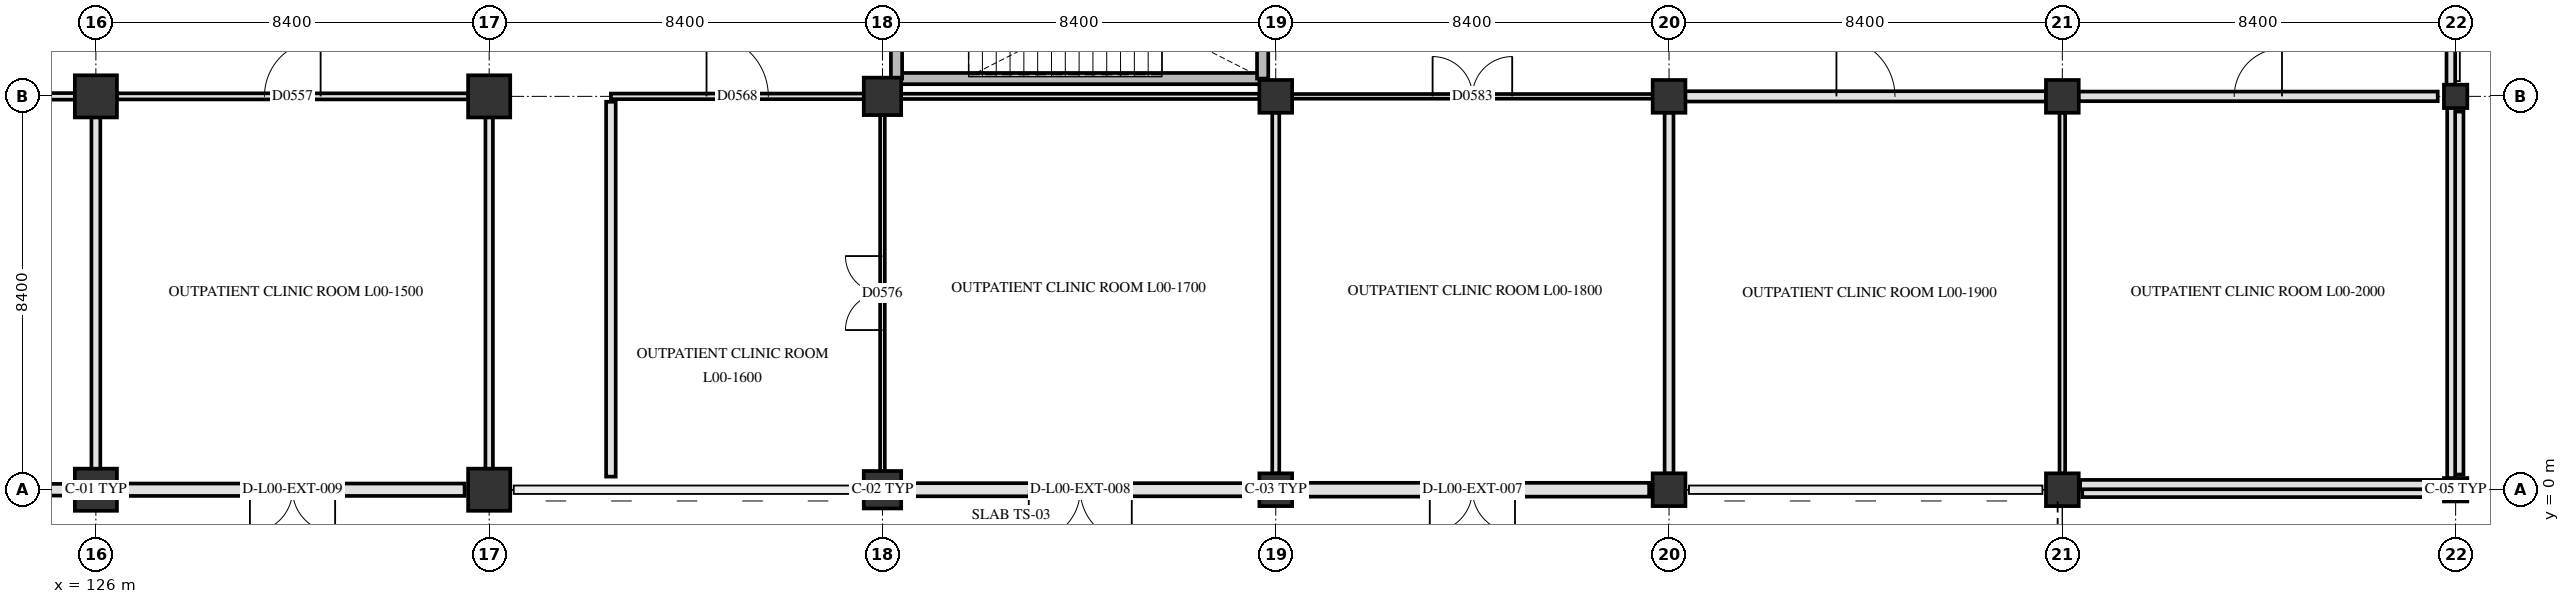
"""IFC4 building model, lengths in metres.
Left out: names, types, materials, properties, quantities, classifications, styles, units other than length and angle.
Written with IfcOpenShell. Run it as: python <this file> out.ifc"""

import sys

from ifc_helpers import new_model, si_unit, direction, frame, frame_2d, origin, origin_2d, place, context, subcontext, project, spatial, rectangle, extrude, element, fill, save


model = new_model("IFC4")
c1 = context("Model", 3, precision=1e-05, world=origin(), true_north=direction((0.0, 1.0)))
c2 = subcontext(c1, "Body", "Model", "MODEL_VIEW")
j1 = project(units=[si_unit("LENGTHUNIT", "METRE"), si_unit("PLANEANGLEUNIT", "RADIAN")], contexts=[c1])
p1 = place(None, origin())
s1 = spatial("IfcSite", under=j1, at=p1, CompositionType="ELEMENT")
p2 = place(p1, origin())
s2 = spatial("IfcBuilding", under=s1, at=p2, CompositionType="ELEMENT")
p3 = place(p2, origin())
s3 = spatial("IfcBuildingStorey", under=s2, at=p3, CompositionType="ELEMENT", Elevation=0.0)
for number, where, z_axis, x_axis in (
    (1, (126.0, 0.0, 0.0), (0.0, 0.0, 1.0), (1.0, 0.0, 0.0)),
    (2, (126.0, 8.4, 0.0), (0.0, 0.0, 1.0), (1.0, 0.0, 0.0)),
    (3, (134.4, 0.0, 0.0), (0.0, 0.0, 1.0), (1.0, 0.0, 0.0)),
    (4, (134.4, 8.4, 0.0), (0.0, 0.0, 1.0), (1.0, 0.0, 0.0)),
):
    element("IfcColumn", number, at=place(p3, frame(where, z_axis=z_axis, x_axis=x_axis)), inside=s3, PredefinedType="COLUMN", context=c2, shape_type="SweptSolid", body=[
        extrude(rectangle(XDim=0.9, YDim=0.9, at=origin_2d()), origin(), (0.0, 0.0, 1.0), 4.8),
    ])
for number, where, z_axis, x_axis in (
    (5, (142.8, 0.0, 0.0), (0.0, 0.0, 1.0), (1.0, 0.0, 0.0)),
    (6, (142.8, 8.4, 0.0), (0.0, 0.0, 1.0), (1.0, 0.0, 0.0)),
):
    element("IfcColumn", number, at=place(p3, frame(where, z_axis=z_axis, x_axis=x_axis)), inside=s3, PredefinedType="COLUMN", context=c2, shape_type="SweptSolid", body=[
        extrude(rectangle(XDim=0.8, YDim=0.8, at=origin_2d()), origin(), (0.0, 0.0, 1.0), 4.8),
    ])
for number, where, z_axis, x_axis in (
    (7, (151.2, 0.0, 0.0), (0.0, 0.0, 1.0), (1.0, 0.0, 0.0)),
    (8, (151.2, 8.4, 0.0), (0.0, 0.0, 1.0), (1.0, 0.0, 0.0)),
    (9, (159.6, 0.0, 0.0), (0.0, 0.0, 1.0), (1.0, 0.0, 0.0)),
    (10, (159.6, 8.4, 0.0), (0.0, 0.0, 1.0), (1.0, 0.0, 0.0)),
    (11, (168.0, 0.0, 0.0), (0.0, 0.0, 1.0), (1.0, 0.0, 0.0)),
    (12, (168.0, 8.4, 0.0), (0.0, 0.0, 1.0), (1.0, 0.0, 0.0)),
):
    element("IfcColumn", number, at=place(p3, frame(where, z_axis=z_axis, x_axis=x_axis)), inside=s3, PredefinedType="COLUMN", context=c2, shape_type="SweptSolid", body=[
        extrude(rectangle(XDim=0.7, YDim=0.7, at=origin_2d()), origin(), (0.0, 0.0, 1.0), 4.8),
    ])
for number, where, z_axis, x_axis in (
    (13, (176.4, 0.0, 0.0), (0.0, 0.0, 1.0), (1.0, 0.0, 0.0)),
    (14, (176.4, 8.4, 0.0), (0.0, 0.0, 1.0), (1.0, 0.0, 0.0)),
):
    element("IfcColumn", number, at=place(p3, frame(where, z_axis=z_axis, x_axis=x_axis)), inside=s3, PredefinedType="COLUMN", context=c2, shape_type="SweptSolid", body=[
        extrude(rectangle(XDim=0.5, YDim=0.5, at=origin_2d()), origin(), (0.0, 0.0, 1.0), 4.8),
    ])
p4 = place(p3, frame((176.4, 8.075, 0.0), z_axis=(0.0, 0.0, 1.0), x_axis=(0.0, -1.0, 0.0)))
e15 = element("IfcWall", 15, at=p4, inside=s3, PredefinedType="SOLIDWALL", context=c2, shape_type="SweptSolid", body=[
    extrude(rectangle(XDim=7.75, YDim=0.335, at=frame_2d((3.875, 0.0))), origin(), (0.0, 0.0, 1.0), 3.79),
])
p5 = place(p3, frame((176.075, 0.0, 0.0), z_axis=(0.0, 0.0, 1.0), x_axis=(-1.0, 0.0, 0.0)))
e16 = element("IfcWall", 16, at=p5, inside=s3, PredefinedType="SOLIDWALL", context=c2, shape_type="SweptSolid", body=[
    extrude(rectangle(XDim=7.65, YDim=0.315, at=frame_2d((3.825, 0.0))), origin(), (0.0, 0.0, 1.0), 3.79),
])
p6 = place(p3, frame((159.175, 0.0, 0.0), z_axis=(0.0, 0.0, 1.0), x_axis=(-1.0, 0.0, 0.0)))
e17 = element("IfcWall", 17, at=p6, inside=s3, PredefinedType="SOLIDWALL", context=c2, shape_type="SweptSolid", body=[
    extrude(rectangle(XDim=7.55, YDim=0.295, at=frame_2d((3.775, 0.0))), origin(), (0.0, 0.0, 1.0), 3.79),
])
p7 = place(p6, frame((2.865, 0.0, 0.0)))
e18 = element("IfcOpeningElement", 18, at=p7, cuts=e17, PredefinedType="OPENING", context=c2, shape_type="SweptSolid", body=[
    extrude(rectangle(XDim=1.82, YDim=2.28, at=frame_2d((0.91, 1.14))), frame((0.0, 0.157, 0.0), z_axis=(0.0, -1.0, 0.0), x_axis=(1.0, 0.0, 0.0)), (0.0, 0.0, 1.0), 0.315),
])
p8 = place(p3, frame((150.775, 0.0, 0.0), z_axis=(0.0, 0.0, 1.0), x_axis=(-1.0, 0.0, 0.0)))
e19 = element("IfcWall", 19, at=p8, inside=s3, PredefinedType="SOLIDWALL", context=c2, shape_type="SweptSolid", body=[
    extrude(rectangle(XDim=7.5, YDim=0.28, at=frame_2d((3.75, 0.0))), origin(), (0.0, 0.0, 1.0), 3.79),
])
p9 = place(p8, frame((2.65, 0.0, 0.0)))
e20 = element("IfcOpeningElement", 20, at=p9, cuts=e19, PredefinedType="OPENING", context=c2, shape_type="SweptSolid", body=[
    extrude(rectangle(XDim=2.2, YDim=2.35, at=frame_2d((1.1, 1.175))), frame((0.0, 0.15, 0.0), z_axis=(0.0, -1.0, 0.0), x_axis=(1.0, 0.0, 0.0)), (0.0, 0.0, 1.0), 0.3),
])
p10 = place(p3, frame((133.875, 0.0, 0.0), z_axis=(0.0, 0.0, 1.0), x_axis=(-1.0, 0.0, 0.0)))
e21 = element("IfcWall", 21, at=p10, inside=s3, PredefinedType="SOLIDWALL", context=c2, shape_type="SweptSolid", body=[
    extrude(rectangle(XDim=7.35, YDim=0.265, at=frame_2d((3.675, 0.0))), origin(), (0.0, 0.0, 1.0), 3.79),
])
p11 = place(p10, frame((2.765, 0.0, 0.0)))
e22 = element("IfcOpeningElement", 22, at=p11, cuts=e21, PredefinedType="OPENING", context=c2, shape_type="SweptSolid", body=[
    extrude(rectangle(XDim=1.82, YDim=2.28, at=frame_2d((0.91, 1.14))), frame((0.0, 0.142, 0.0), z_axis=(0.0, -1.0, 0.0), x_axis=(1.0, 0.0, 0.0)), (0.0, 0.0, 1.0), 0.285),
])
p12 = place(p3, frame((125.475, 0.0, 0.0), z_axis=(0.0, 0.0, 1.0), x_axis=(-1.0, 0.0, 0.0)))
e23 = element("IfcWall", 23, at=p12, inside=s3, PredefinedType="SOLIDWALL", context=c2, shape_type="SweptSolid", body=[
    extrude(rectangle(XDim=7.35, YDim=0.25, at=frame_2d((3.675, 0.0))), origin(), (0.0, 0.0, 1.0), 3.79),
])
p13 = place(p12, frame((2.575, 0.0, 0.0)))
e24 = element("IfcOpeningElement", 24, at=p13, cuts=e23, PredefinedType="OPENING", context=c2, shape_type="SweptSolid", body=[
    extrude(rectangle(XDim=2.2, YDim=2.35, at=frame_2d((1.1, 1.175))), frame((0.0, 0.135, 0.0), z_axis=(0.0, -1.0, 0.0), x_axis=(1.0, 0.0, 0.0)), (0.0, 0.0, 1.0), 0.27),
])
p14 = place(p3, frame((176.298, 16.8, 4.78), z_axis=(0.0, 0.0, 1.0), x_axis=(0.0, -1.0, 0.0)))
e25 = element("IfcWall", 25, at=p14, inside=s3, PredefinedType="PARAPET", context=c2, shape_type="SweptSolid", body=[
    extrude(rectangle(XDim=8.4, YDim=0.185, at=frame_2d((4.2, 0.0))), origin(), (0.0, 0.0, 1.0), 1.17),
])
p15 = place(p3, frame((176.305, 8.4, 4.78), z_axis=(0.0, 0.0, 1.0), x_axis=(0.0, -1.0, 0.0)))
e26 = element("IfcWall", 26, at=p15, inside=s3, PredefinedType="PARAPET", context=c2, shape_type="SweptSolid", body=[
    extrude(rectangle(XDim=8.4, YDim=0.17, at=frame_2d((4.2, 0.0))), origin(), (0.0, 0.0, 1.0), 1.17),
])
p16 = place(p3, frame((176.4, 0.11, 4.78), z_axis=(0.0, 0.0, 1.0), x_axis=(-1.0, 0.0, 0.0)))
e27 = element("IfcWall", 27, at=p16, inside=s3, PredefinedType="PARAPET", context=c2, shape_type="SweptSolid", body=[
    extrude(rectangle(XDim=8.02, YDim=0.2, at=frame_2d((4.01, 0.0))), origin(), (0.0, 0.0, 1.0), 1.17),
])
p17 = place(p3, frame((143.1, 8.78, 0.0), z_axis=(0.0, 0.0, 1.0), x_axis=(1.0, 0.0, 0.0)))
e28 = element("IfcWall", 28, at=p17, inside=s3, PredefinedType="SHEAR", context=c2, shape_type="SweptSolid", body=[
    extrude(rectangle(XDim=7.82, YDim=0.24, at=frame_2d((3.91, 0.0))), origin(), (0.0, 0.0, 1.0), 4.5),
])
for number, where, z_axis, x_axis in (
    (29, (143.1, 8.78, 0.0), (0.0, 0.0, 1.0), (0.0, 1.0, 0.0)),
    (30, (150.92, 8.78, 0.0), (0.0, 0.0, 1.0), (0.0, 1.0, 0.0)),
):
    element("IfcWall", number, at=place(p3, frame(where, z_axis=z_axis, x_axis=x_axis)), inside=s3, PredefinedType="SHEAR", context=c2, shape_type="SweptSolid", body=[
        extrude(rectangle(XDim=3.32, YDim=0.24, at=frame_2d((1.66, 0.0))), origin(), (0.0, 0.0, 1.0), 4.5),
    ])
p18 = place(p3, frame((118.045, 8.4, 0.0), z_axis=(0.0, 0.0, 1.0), x_axis=(1.0, 0.0, 0.0)))
e31 = element("IfcWall", 31, at=p18, inside=s3, PredefinedType="PARTITIONING", context=c2, shape_type="SweptSolid", body=[
    extrude(rectangle(XDim=7.51, YDim=0.14, at=frame_2d((3.755, 0.0))), origin(), (0.0, 0.0, 1.0), 3.84),
])
p19 = place(p18, frame((2.965, 0.0, 0.0)))
e32 = element("IfcOpeningElement", 32, at=p19, cuts=e31, PredefinedType="OPENING", context=c2, shape_type="SweptSolid", body=[
    extrude(rectangle(XDim=1.58, YDim=2.22, at=frame_2d((0.79, 1.11))), frame((0.0, 0.08, 0.0), z_axis=(0.0, -1.0, 0.0), x_axis=(1.0, 0.0, 0.0)), (0.0, 0.0, 1.0), 0.16),
])
p20 = place(p3, frame((126.445, 8.4, 0.0), z_axis=(0.0, 0.0, 1.0), x_axis=(1.0, 0.0, 0.0)))
e33 = element("IfcWall", 33, at=p20, inside=s3, PredefinedType="PARTITIONING", context=c2, shape_type="SweptSolid", body=[
    extrude(rectangle(XDim=7.51, YDim=0.13, at=frame_2d((3.755, 0.0))), origin(), (0.0, 0.0, 1.0), 3.84),
])
p21 = place(p20, frame((3.155, 0.0, 0.0)))
e34 = element("IfcOpeningElement", 34, at=p21, cuts=e33, PredefinedType="OPENING", context=c2, shape_type="SweptSolid", body=[
    extrude(rectangle(XDim=1.2, YDim=2.15, at=frame_2d((0.6, 1.075))), frame((0.0, 0.075, 0.0), z_axis=(0.0, -1.0, 0.0), x_axis=(1.0, 0.0, 0.0)), (0.0, 0.0, 1.0), 0.15),
])
p22 = place(p3, frame((137.0, 8.4, 0.0), z_axis=(0.0, 0.0, 1.0), x_axis=(1.0, 0.0, 0.0)))
e35 = element("IfcWall", 35, at=p22, inside=s3, PredefinedType="PARTITIONING", context=c2, shape_type="SweptSolid", body=[
    extrude(rectangle(XDim=5.405, YDim=0.12, at=frame_2d((2.703, 0.0))), origin(), (0.0, 0.0, 1.0), 3.84),
])
p23 = place(p22, frame((2.042, 0.0, 0.0)))
e36 = element("IfcOpeningElement", 36, at=p23, cuts=e35, PredefinedType="OPENING", context=c2, shape_type="SweptSolid", body=[
    extrude(rectangle(XDim=1.32, YDim=2.18, at=frame_2d((0.66, 1.09))), frame((0.0, 0.07, 0.0), z_axis=(0.0, -1.0, 0.0), x_axis=(1.0, 0.0, 0.0)), (0.0, 0.0, 1.0), 0.14),
])
p24 = place(p3, frame((143.195, 8.4, 0.0), z_axis=(0.0, 0.0, 1.0), x_axis=(1.0, 0.0, 0.0)))
e37 = element("IfcWall", 37, at=p24, inside=s3, PredefinedType="PARTITIONING", context=c2, shape_type="SweptSolid", body=[
    extrude(rectangle(XDim=7.66, YDim=0.112, at=frame_2d((3.83, 0.0))), origin(), (0.0, 0.0, 1.0), 3.84),
])
p25 = place(p3, frame((151.545, 8.4, 0.0), z_axis=(0.0, 0.0, 1.0), x_axis=(1.0, 0.0, 0.0)))
e38 = element("IfcWall", 38, at=p25, inside=s3, PredefinedType="PARTITIONING", context=c2, shape_type="SweptSolid", body=[
    extrude(rectangle(XDim=7.71, YDim=0.1, at=frame_2d((3.855, 0.0))), origin(), (0.0, 0.0, 1.0), 3.84),
])
p26 = place(p25, frame((3.005, 0.0, 0.0)))
e39 = element("IfcOpeningElement", 39, at=p26, cuts=e38, PredefinedType="OPENING", context=c2, shape_type="SweptSolid", body=[
    extrude(rectangle(XDim=1.7, YDim=2.25, at=frame_2d((0.85, 1.125))), frame((0.0, 0.06, 0.0), z_axis=(0.0, -1.0, 0.0), x_axis=(1.0, 0.0, 0.0)), (0.0, 0.0, 1.0), 0.12),
])
p27 = place(p3, frame((159.945, 8.4, 0.0), z_axis=(0.0, 0.0, 1.0), x_axis=(1.0, 0.0, 0.0)))
e40 = element("IfcWall", 40, at=p27, inside=s3, PredefinedType="PARTITIONING", context=c2, shape_type="SweptSolid", body=[
    extrude(rectangle(XDim=7.71, YDim=0.22, at=frame_2d((3.855, 0.0))), origin(), (0.0, 0.0, 1.0), 3.84),
])
p28 = place(p27, frame((3.23, 0.0, 0.0)))
e41 = element("IfcOpeningElement", 41, at=p28, cuts=e40, PredefinedType="OPENING", context=c2, shape_type="SweptSolid", body=[
    extrude(rectangle(XDim=1.25, YDim=2.2, at=frame_2d((0.625, 1.1))), frame((0.0, 0.12, 0.0), z_axis=(0.0, -1.0, 0.0), x_axis=(1.0, 0.0, 0.0)), (0.0, 0.0, 1.0), 0.24),
])
p29 = place(p3, frame((168.345, 8.4, 0.0), z_axis=(0.0, 0.0, 1.0), x_axis=(1.0, 0.0, 0.0)))
e42 = element("IfcWall", 42, at=p29, inside=s3, PredefinedType="PARTITIONING", context=c2, shape_type="SweptSolid", body=[
    extrude(rectangle(XDim=7.673, YDim=0.205, at=frame_2d((3.836, 0.0))), origin(), (0.0, 0.0, 1.0), 3.84),
])
p30 = place(p29, frame((3.326, 0.0, 0.0)))
e43 = element("IfcOpeningElement", 43, at=p30, cuts=e42, PredefinedType="OPENING", context=c2, shape_type="SweptSolid", body=[
    extrude(rectangle(XDim=1.02, YDim=2.12, at=frame_2d((0.51, 1.06))), frame((0.0, 0.113, 0.0), z_axis=(0.0, -1.0, 0.0), x_axis=(1.0, 0.0, 0.0)), (0.0, 0.0, 1.0), 0.225),
])
p31 = place(p3, frame((126.0, 0.445, 0.0), z_axis=(0.0, 0.0, 1.0), x_axis=(0.0, 1.0, 0.0)))
e44 = element("IfcWall", 44, at=p31, inside=s3, PredefinedType="PARTITIONING", context=c2, shape_type="SweptSolid", body=[
    extrude(rectangle(XDim=7.51, YDim=0.19, at=frame_2d((3.755, 0.0))), origin(), (0.0, 0.0, 1.0), 3.89),
])
p32 = place(p3, frame((134.4, 0.445, 0.0), z_axis=(0.0, 0.0, 1.0), x_axis=(0.0, 1.0, 0.0)))
e45 = element("IfcWall", 45, at=p32, inside=s3, PredefinedType="PARTITIONING", context=c2, shape_type="SweptSolid", body=[
    extrude(rectangle(XDim=7.51, YDim=0.16, at=frame_2d((3.755, 0.0))), origin(), (0.0, 0.0, 1.0), 3.89),
])
p33 = place(p3, frame((137.0, 0.28, 0.0), z_axis=(0.0, 0.0, 1.0), x_axis=(0.0, 1.0, 0.0)))
e46 = element("IfcWall", 46, at=p33, inside=s3, PredefinedType="PARTITIONING", context=c2, shape_type="SweptSolid", body=[
    extrude(rectangle(XDim=8.005, YDim=0.205, at=frame_2d((4.002, 0.0))), origin(), (0.0, 0.0, 1.0), 3.84),
])
p34 = place(p3, frame((142.8, 0.395, 0.0), z_axis=(0.0, 0.0, 1.0), x_axis=(0.0, 1.0, 0.0)))
e47 = element("IfcWall", 47, at=p34, inside=s3, PredefinedType="PARTITIONING", context=c2, shape_type="SweptSolid", body=[
    extrude(rectangle(XDim=7.61, YDim=0.1, at=frame_2d((3.805, 0.0))), origin(), (0.0, 0.0, 1.0), 3.89),
])
p35 = place(p34, frame((3.015, 0.0, 0.0)))
e48 = element("IfcOpeningElement", 48, at=p35, cuts=e47, PredefinedType="OPENING", context=c2, shape_type="SweptSolid", body=[
    extrude(rectangle(XDim=1.58, YDim=2.22, at=frame_2d((0.79, 1.11))), frame((0.0, 0.06, 0.0), z_axis=(0.0, -1.0, 0.0), x_axis=(1.0, 0.0, 0.0)), (0.0, 0.0, 1.0), 0.12),
])
p36 = place(p3, frame((151.2, 0.345, 0.0), z_axis=(0.0, 0.0, 1.0), x_axis=(0.0, 1.0, 0.0)))
e49 = element("IfcWall", 49, at=p36, inside=s3, PredefinedType="PARTITIONING", context=c2, shape_type="SweptSolid", body=[
    extrude(rectangle(XDim=7.71, YDim=0.15, at=frame_2d((3.855, 0.0))), origin(), (0.0, 0.0, 1.0), 3.89),
])
p37 = place(p3, frame((159.6, 0.345, 0.0), z_axis=(0.0, 0.0, 1.0), x_axis=(0.0, 1.0, 0.0)))
e50 = element("IfcWall", 50, at=p37, inside=s3, PredefinedType="PARTITIONING", context=c2, shape_type="SweptSolid", body=[
    extrude(rectangle(XDim=7.71, YDim=0.19, at=frame_2d((3.855, 0.0))), origin(), (0.0, 0.0, 1.0), 3.89),
])
p38 = place(p3, frame((168.0, 0.345, 0.0), z_axis=(0.0, 0.0, 1.0), x_axis=(0.0, 1.0, 0.0)))
e51 = element("IfcWall", 51, at=p38, inside=s3, PredefinedType="PARTITIONING", context=c2, shape_type="SweptSolid", body=[
    extrude(rectangle(XDim=7.71, YDim=0.12, at=frame_2d((3.855, 0.0))), origin(), (0.0, 0.0, 1.0), 3.89),
])
p39 = place(p7, origin())
e52 = element("IfcDoor", 52, at=p39, inside=s3, OperationType="DOUBLE_SWING_LEFT", PredefinedType="DOOR", context=c2, shape_type="SweptSolid", body=[
    extrude(rectangle(XDim=1.82, YDim=2.28, at=frame_2d((0.91, 1.14))), frame((0.0, 0.025, 0.0), z_axis=(0.0, -1.0, 0.0), x_axis=(1.0, 0.0, 0.0)), (0.0, 0.0, 1.0), 0.05),
])
fill(e18, e52)
p40 = place(p9, origin())
e53 = element("IfcDoor", 53, at=p40, inside=s3, OperationType="DOUBLE_SWING_LEFT", PredefinedType="DOOR", context=c2, shape_type="SweptSolid", body=[
    extrude(rectangle(XDim=2.2, YDim=2.35, at=frame_2d((1.1, 1.175))), frame((0.0, 0.025, 0.0), z_axis=(0.0, -1.0, 0.0), x_axis=(1.0, 0.0, 0.0)), (0.0, 0.0, 1.0), 0.05),
])
fill(e20, e53)
p41 = place(p11, origin())
e54 = element("IfcDoor", 54, at=p41, inside=s3, OperationType="DOUBLE_SWING_LEFT", PredefinedType="DOOR", context=c2, shape_type="SweptSolid", body=[
    extrude(rectangle(XDim=1.82, YDim=2.28, at=frame_2d((0.91, 1.14))), frame((0.0, 0.025, 0.0), z_axis=(0.0, -1.0, 0.0), x_axis=(1.0, 0.0, 0.0)), (0.0, 0.0, 1.0), 0.05),
])
fill(e22, e54)
p42 = place(p21, origin())
e55 = element("IfcDoor", 55, at=p42, inside=s3, OperationType="SINGLE_SWING_RIGHT", PredefinedType="DOOR", context=c2, shape_type="SweptSolid", body=[
    extrude(rectangle(XDim=1.2, YDim=2.15, at=frame_2d((0.6, 1.075))), frame((0.0, 0.025, 0.0), z_axis=(0.0, -1.0, 0.0), x_axis=(1.0, 0.0, 0.0)), (0.0, 0.0, 1.0), 0.05),
])
fill(e34, e55)
p43 = place(p23, origin())
e56 = element("IfcDoor", 56, at=p43, inside=s3, OperationType="SINGLE_SWING_LEFT", PredefinedType="DOOR", context=c2, shape_type="SweptSolid", body=[
    extrude(rectangle(XDim=1.32, YDim=2.18, at=frame_2d((0.66, 1.09))), frame((0.0, 0.025, 0.0), z_axis=(0.0, -1.0, 0.0), x_axis=(1.0, 0.0, 0.0)), (0.0, 0.0, 1.0), 0.05),
])
fill(e36, e56)
p44 = place(p35, origin())
e57 = element("IfcDoor", 57, at=p44, inside=s3, OperationType="DOUBLE_SWING_LEFT", PredefinedType="DOOR", context=c2, shape_type="SweptSolid", body=[
    extrude(rectangle(XDim=1.58, YDim=2.22, at=frame_2d((0.79, 1.11))), frame((0.0, 0.025, 0.0), z_axis=(0.0, -1.0, 0.0), x_axis=(1.0, 0.0, 0.0)), (0.0, 0.0, 1.0), 0.05),
])
fill(e48, e57)
p45 = place(p26, origin())
e58 = element("IfcDoor", 58, at=p45, inside=s3, OperationType="DOUBLE_SWING_RIGHT", PredefinedType="DOOR", context=c2, shape_type="SweptSolid", body=[
    extrude(rectangle(XDim=1.7, YDim=2.25, at=frame_2d((0.85, 1.125))), frame((0.0, 0.025, 0.0), z_axis=(0.0, -1.0, 0.0), x_axis=(1.0, 0.0, 0.0)), (0.0, 0.0, 1.0), 0.05),
])
fill(e39, e58)
p46 = place(p28, origin())
e59 = element("IfcDoor", 59, at=p46, inside=s3, OperationType="SINGLE_SWING_LEFT", PredefinedType="DOOR", context=c2, shape_type="SweptSolid", body=[
    extrude(rectangle(XDim=1.25, YDim=2.2, at=frame_2d((0.625, 1.1))), frame((0.0, 0.025, 0.0), z_axis=(0.0, -1.0, 0.0), x_axis=(1.0, 0.0, 0.0)), (0.0, 0.0, 1.0), 0.05),
])
fill(e41, e59)
p47 = place(p30, origin())
e60 = element("IfcDoor", 60, at=p47, inside=s3, OperationType="SINGLE_SWING_RIGHT", PredefinedType="DOOR", context=c2, shape_type="SweptSolid", body=[
    extrude(rectangle(XDim=1.02, YDim=2.12, at=frame_2d((0.51, 1.06))), frame((0.0, 0.025, 0.0), z_axis=(0.0, -1.0, 0.0), x_axis=(1.0, 0.0, 0.0)), (0.0, 0.0, 1.0), 0.05),
])
fill(e43, e60)
save(model, sys.argv[1])
